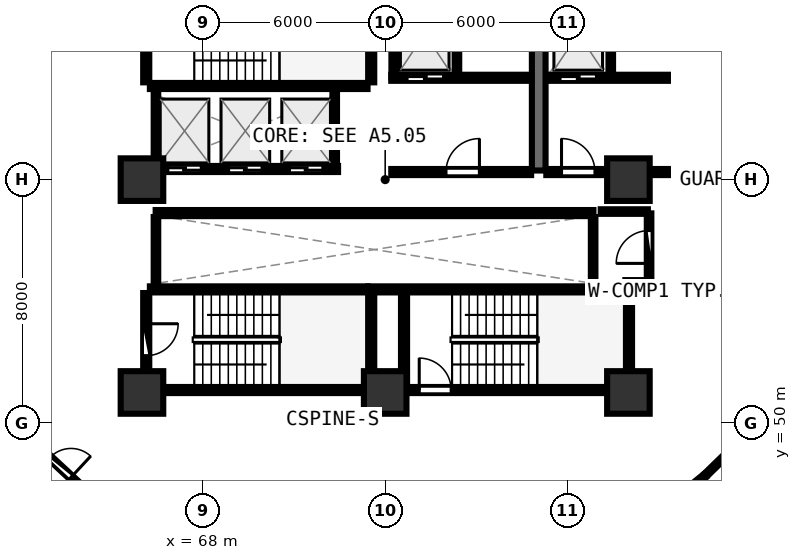
"""IFC4 building model, lengths in metres.
Left out: names, types, materials, properties, quantities, classifications, styles, units other than length and angle.
Written with IfcOpenShell. Run it as: python <this file> out.ifc"""

import sys

from ifc_helpers import new_model, si_unit, direction, frame, frame_2d, origin, origin_2d, place, context, subcontext, project, spatial, rectangle, extrude, element, fill, save


model = new_model("IFC4")
c1 = context("Model", 3, precision=1e-05, world=origin(), true_north=direction((0.0, 1.0)))
c2 = subcontext(c1, "Body", "Model", "MODEL_VIEW")
j1 = project(units=[si_unit("LENGTHUNIT", "METRE"), si_unit("PLANEANGLEUNIT", "RADIAN")], contexts=[c1])
p1 = place(None, origin())
s1 = spatial("IfcSite", under=j1, at=p1, CompositionType="ELEMENT")
p2 = place(p1, origin())
s2 = spatial("IfcBuilding", under=s1, at=p2, CompositionType="ELEMENT")
p3 = place(p2, frame((0.0, 0.0, 22.5)))
s3 = spatial("IfcBuildingStorey", under=s2, at=p3, CompositionType="ELEMENT", Elevation=22.5)
for number, where, z_axis, x_axis in (
    (1, (66.0, 51.0, 0.0), (0.0, 0.0, 1.0), (1.0, 0.0, 0.0)),
    (2, (74.0, 51.0, 0.0), (0.0, 0.0, 1.0), (1.0, 0.0, 0.0)),
    (3, (82.0, 51.0, 0.0), (0.0, 0.0, 1.0), (1.0, 0.0, 0.0)),
    (4, (82.0, 58.0, 0.0), (0.0, 0.0, 1.0), (1.0, 0.0, 0.0)),
    (5, (66.0, 58.0, 0.0), (0.0, 0.0, 1.0), (1.0, 0.0, 0.0)),
):
    element("IfcColumn", number, at=place(p3, frame(where, z_axis=z_axis, x_axis=x_axis)), inside=s3, PredefinedType="PILASTER", context=c2, shape_type="SweptSolid", body=[
        extrude(rectangle(XDim=1.4, YDim=1.4, at=origin_2d()), origin(), (0.0, 0.0, 1.0), 3.75),
    ])
p4 = place(p3, frame((66.26, 61.08, 0.0), z_axis=(0.0, 0.0, 1.0), x_axis=(1.0, 0.0, 0.0)))
e6 = element("IfcWall", 6, at=p4, inside=s3, PredefinedType="SHEAR", context=c2, shape_type="SweptSolid", body=[
    extrude(rectangle(XDim=7.16, YDim=0.2, at=frame_2d((3.58, 0.0))), origin(), (0.0, 0.0, 1.0), 3.49),
])
p5 = place(p3, frame((73.54, 61.2, 0.0), z_axis=(0.0, 0.0, 1.0), x_axis=(0.0, 1.0, 0.0)))
e7 = element("IfcWall", 7, at=p5, inside=s3, PredefinedType="SHEAR", context=c2, shape_type="SweptSolid", body=[
    extrude(rectangle(XDim=3.07, YDim=0.2, at=frame_2d((1.535, 0.0))), origin(), (0.0, 0.0, 1.0), 3.49),
])
p6 = place(p3, frame((66.14, 64.27, 0.0), z_axis=(0.0, 0.0, 1.0), x_axis=(0.0, -1.0, 0.0)))
e8 = element("IfcWall", 8, at=p6, inside=s3, PredefinedType="SHEAR", context=c2, shape_type="SweptSolid", body=[
    extrude(rectangle(XDim=3.07, YDim=0.2, at=frame_2d((1.535, 0.0))), origin(), (0.0, 0.0, 1.0), 3.49),
])
p7 = place(p6, frame((1.01, 0.0, 0.0)))
e9 = element("IfcOpeningElement", 9, at=p7, cuts=e8, PredefinedType="OPENING", context=c2, shape_type="SweptSolid", body=[
    extrude(rectangle(XDim=1.05, YDim=2.1, at=frame_2d((0.525, 1.05))), frame((0.0, 0.11, 0.0), z_axis=(0.0, -1.0, 0.0), x_axis=(1.0, 0.0, 0.0)), (0.0, 0.0, 1.0), 0.22),
])
p8 = place(p3, frame((74.0, 51.08, 0.0), z_axis=(0.0, 0.0, 1.0), x_axis=(1.0, 0.0, 0.0)))
e10 = element("IfcWall", 10, at=p8, inside=s3, PredefinedType="SHEAR", context=c2, shape_type="SweptSolid", body=[
    extrude(rectangle(XDim=7.9, YDim=0.2, at=frame_2d((3.95, 0.0))), origin(), (0.0, 0.0, 1.0), 3.49),
])
p9 = place(p8, frame((1.12, 0.0, 0.0)))
e11 = element("IfcOpeningElement", 11, at=p9, cuts=e10, PredefinedType="OPENING", context=c2, shape_type="SweptSolid", body=[
    extrude(rectangle(XDim=1.05, YDim=2.1, at=frame_2d((0.525, 1.05))), frame((0.0, 0.11, 0.0), z_axis=(0.0, -1.0, 0.0), x_axis=(1.0, 0.0, 0.0)), (0.0, 0.0, 1.0), 0.22),
])
p10 = place(p3, frame((82.02, 51.2, 0.0), z_axis=(0.0, 0.0, 1.0), x_axis=(0.0, 1.0, 0.0)))
e12 = element("IfcWall", 12, at=p10, inside=s3, PredefinedType="SHEAR", context=c2, shape_type="SweptSolid", body=[
    extrude(rectangle(XDim=3.07, YDim=0.2, at=frame_2d((1.535, 0.0))), origin(), (0.0, 0.0, 1.0), 3.49),
])
p11 = place(p3, frame((81.9, 54.39, 0.0), z_axis=(0.0, 0.0, 1.0), x_axis=(-1.0, 0.0, 0.0)))
e13 = element("IfcWall", 13, at=p11, inside=s3, PredefinedType="SHEAR", context=c2, shape_type="SweptSolid", body=[
    extrude(rectangle(XDim=8.46, YDim=0.2, at=frame_2d((4.23, 0.0))), origin(), (0.0, 0.0, 1.0), 3.49),
])
p12 = place(p3, frame((74.62, 54.27, 0.0), z_axis=(0.0, 0.0, 1.0), x_axis=(0.0, -1.0, 0.0)))
e14 = element("IfcWall", 14, at=p12, inside=s3, PredefinedType="SHEAR", context=c2, shape_type="SweptSolid", body=[
    extrude(rectangle(XDim=3.07, YDim=0.2, at=frame_2d((1.535, 0.0))), origin(), (0.0, 0.0, 1.0), 3.49),
])
p13 = place(p3, frame((66.26, 51.08, 0.0), z_axis=(0.0, 0.0, 1.0), x_axis=(1.0, 0.0, 0.0)))
e15 = element("IfcWall", 15, at=p13, inside=s3, PredefinedType="SHEAR", context=c2, shape_type="SweptSolid", body=[
    extrude(rectangle(XDim=7.16, YDim=0.2, at=frame_2d((3.58, 0.0))), origin(), (0.0, 0.0, 1.0), 3.49),
])
p14 = place(p3, frame((73.54, 51.2, 0.0), z_axis=(0.0, 0.0, 1.0), x_axis=(0.0, 1.0, 0.0)))
e16 = element("IfcWall", 16, at=p14, inside=s3, PredefinedType="SHEAR", context=c2, shape_type="SweptSolid", body=[
    extrude(rectangle(XDim=3.07, YDim=0.2, at=frame_2d((1.535, 0.0))), origin(), (0.0, 0.0, 1.0), 3.49),
])
p15 = place(p3, frame((73.42, 54.39, 0.0), z_axis=(0.0, 0.0, 1.0), x_axis=(-1.0, 0.0, 0.0)))
e17 = element("IfcWall", 17, at=p15, inside=s3, PredefinedType="SHEAR", context=c2, shape_type="SweptSolid", body=[
    extrude(rectangle(XDim=7.16, YDim=0.2, at=frame_2d((3.58, 0.0))), origin(), (0.0, 0.0, 1.0), 3.49),
])
p16 = place(p3, frame((66.14, 54.27, 0.0), z_axis=(0.0, 0.0, 1.0), x_axis=(0.0, -1.0, 0.0)))
e18 = element("IfcWall", 18, at=p16, inside=s3, PredefinedType="SHEAR", context=c2, shape_type="SweptSolid", body=[
    extrude(rectangle(XDim=3.07, YDim=0.2, at=frame_2d((1.535, 0.0))), origin(), (0.0, 0.0, 1.0), 3.49),
])
p17 = place(p16, frame((1.01, 0.0, 0.0)))
e19 = element("IfcOpeningElement", 19, at=p17, cuts=e18, PredefinedType="OPENING", context=c2, shape_type="SweptSolid", body=[
    extrude(rectangle(XDim=1.05, YDim=2.1, at=frame_2d((0.525, 1.05))), frame((0.0, 0.11, 0.0), z_axis=(0.0, -1.0, 0.0), x_axis=(1.0, 0.0, 0.0)), (0.0, 0.0, 1.0), 0.22),
])
p18 = place(p3, frame((79.05, 58.3, 0.0), z_axis=(0.0, 0.0, 1.0), x_axis=(0.0, 1.0, 0.0)))
e20 = element("IfcWall", 20, at=p18, inside=s3, PredefinedType="SHEAR", context=c2, shape_type="SweptSolid", body=[
    extrude(rectangle(XDim=6.3, YDim=0.45, at=frame_2d((3.15, 0.0))), origin(), (0.0, 0.0, 1.0), 3.49),
])
p19 = place(p3, frame((74.2, 61.35, 0.0), z_axis=(0.0, 0.0, 1.0), x_axis=(1.0, 0.0, 0.0)))
e21 = element("IfcWall", 21, at=p19, inside=s3, PredefinedType="SOLIDWALL", context=c2, shape_type="SweptSolid", body=[
    extrude(rectangle(XDim=4.6, YDim=0.2, at=frame_2d((2.3, 0.0))), origin(), (0.0, 0.0, 1.0), 3.48),
])
p20 = place(p19, frame((0.52, 0.0, 0.0)))
e22 = element("IfcOpeningElement", 22, at=p20, cuts=e21, PredefinedType="OPENING", context=c2, shape_type="SweptSolid", body=[
    extrude(rectangle(XDim=1.2, YDim=2.15, at=frame_2d((0.6, 1.075))), frame((0.0, 0.11, 0.0), z_axis=(0.0, -1.0, 0.0), x_axis=(1.0, 0.0, 0.0)), (0.0, 0.0, 1.0), 0.22),
])
p21 = place(p3, frame((74.28, 61.35, 0.0), z_axis=(0.0, 0.0, 1.0), x_axis=(0.0, 1.0, 0.0)))
e23 = element("IfcWall", 23, at=p21, inside=s3, PredefinedType="PARTITIONING", context=c2, shape_type="SweptSolid", body=[
    extrude(rectangle(XDim=2.97, YDim=0.15, at=frame_2d((1.485, 0.0))), origin(), (0.0, 0.0, 1.0), 3.48),
])
p22 = place(p3, frame((76.36, 61.48, 0.0), z_axis=(0.0, 0.0, 1.0), x_axis=(0.0, 1.0, 0.0)))
e24 = element("IfcWall", 24, at=p22, inside=s3, PredefinedType="PARTITIONING", context=c2, shape_type="SweptSolid", body=[
    extrude(rectangle(XDim=2.84, YDim=0.15, at=frame_2d((1.42, 0.0))), origin(), (0.0, 0.0, 1.0), 3.48),
])
p23 = place(p3, frame((79.3, 61.35, 0.0), z_axis=(0.0, 0.0, 1.0), x_axis=(1.0, 0.0, 0.0)))
e25 = element("IfcWall", 25, at=p23, inside=s3, PredefinedType="SOLIDWALL", context=c2, shape_type="SweptSolid", body=[
    extrude(rectangle(XDim=4.0, YDim=0.2, at=frame_2d((2.0, 0.0))), origin(), (0.0, 0.0, 1.0), 2.775),
])
p24 = place(p23, frame((0.45, 0.0, 0.0)))
e26 = element("IfcOpeningElement", 26, at=p24, cuts=e25, PredefinedType="OPENING", context=c2, shape_type="SweptSolid", body=[
    extrude(rectangle(XDim=1.2, YDim=2.15, at=frame_2d((0.6, 1.075))), frame((0.0, 0.11, 0.0), z_axis=(0.0, -1.0, 0.0), x_axis=(1.0, 0.0, 0.0)), (0.0, 0.0, 1.0), 0.22),
])
p25 = place(p3, frame((81.42, 61.48, 0.0), z_axis=(0.0, 0.0, 1.0), x_axis=(0.0, 1.0, 0.0)))
e27 = element("IfcWall", 27, at=p25, inside=s3, PredefinedType="PARTITIONING", context=c2, shape_type="SweptSolid", body=[
    extrude(rectangle(XDim=2.84, YDim=0.15, at=frame_2d((1.42, 0.0))), origin(), (0.0, 0.0, 1.0), 3.48),
])
p26 = place(p3, frame((74.2, 58.25, 0.0), z_axis=(0.0, 0.0, 1.0), x_axis=(1.0, 0.0, 0.0)))
e28 = element("IfcWall", 28, at=p26, inside=s3, PredefinedType="SOLIDWALL", context=c2, shape_type="SweptSolid", body=[
    extrude(rectangle(XDim=4.6, YDim=0.2, at=frame_2d((2.3, 0.0))), origin(), (0.0, 0.0, 1.0), 3.48),
])
p27 = place(p26, frame((1.8, 0.0, 0.0)))
e29 = element("IfcOpeningElement", 29, at=p27, cuts=e28, PredefinedType="OPENING", context=c2, shape_type="SweptSolid", body=[
    extrude(rectangle(XDim=1.1, YDim=2.1, at=frame_2d((0.55, 1.05))), frame((0.0, 0.11, 0.0), z_axis=(0.0, -1.0, 0.0), x_axis=(1.0, 0.0, 0.0)), (0.0, 0.0, 1.0), 0.22),
])
p28 = place(p3, frame((79.3, 58.25, 0.0), z_axis=(0.0, 0.0, 1.0), x_axis=(1.0, 0.0, 0.0)))
e30 = element("IfcWall", 30, at=p28, inside=s3, PredefinedType="SOLIDWALL", context=c2, shape_type="SweptSolid", body=[
    extrude(rectangle(XDim=4.0, YDim=0.2, at=frame_2d((2.0, 0.0))), origin(), (0.0, 0.0, 1.0), 2.775),
])
p29 = place(p28, frame((0.5, 0.0, 0.0)))
e31 = element("IfcOpeningElement", 31, at=p29, cuts=e30, PredefinedType="OPENING", context=c2, shape_type="SweptSolid", body=[
    extrude(rectangle(XDim=1.1, YDim=2.1, at=frame_2d((0.55, 1.05))), frame((0.0, 0.11, 0.0), z_axis=(0.0, -1.0, 0.0), x_axis=(1.0, 0.0, 0.0)), (0.0, 0.0, 1.0), 0.22),
])
p30 = place(p3, frame((66.45, 58.35, 0.0), z_axis=(0.0, 0.0, 1.0), x_axis=(1.0, 0.0, 0.0)))
e32 = element("IfcWall", 32, at=p30, inside=s3, PredefinedType="SOLIDWALL", context=c2, shape_type="SweptSolid", body=[
    extrude(rectangle(XDim=6.0, YDim=0.2, at=frame_2d((3.0, 0.0))), origin(), (0.0, 0.0, 1.0), 3.48),
])
p31 = place(p30, frame((0.4, 0.0, 0.0)))
e33 = element("IfcOpeningElement", 33, at=p31, cuts=e32, PredefinedType="OPENING", context=c2, shape_type="SweptSolid", body=[
    extrude(rectangle(XDim=1.1, YDim=2.1, at=frame_2d((0.55, 1.05))), frame((0.0, 0.11, 0.0), z_axis=(0.0, -1.0, 0.0), x_axis=(1.0, 0.0, 0.0)), (0.0, 0.0, 1.0), 0.22),
])
p32 = place(p30, frame((2.4, 0.0, 0.0)))
e34 = element("IfcOpeningElement", 34, at=p32, cuts=e32, PredefinedType="OPENING", context=c2, shape_type="SweptSolid", body=[
    extrude(rectangle(XDim=1.1, YDim=2.1, at=frame_2d((0.55, 1.05))), frame((0.0, 0.11, 0.0), z_axis=(0.0, -1.0, 0.0), x_axis=(1.0, 0.0, 0.0)), (0.0, 0.0, 1.0), 0.22),
])
p33 = place(p30, frame((4.4, 0.0, 0.0)))
e35 = element("IfcOpeningElement", 35, at=p33, cuts=e32, PredefinedType="OPENING", context=c2, shape_type="SweptSolid", body=[
    extrude(rectangle(XDim=1.1, YDim=2.1, at=frame_2d((0.55, 1.05))), frame((0.0, 0.11, 0.0), z_axis=(0.0, -1.0, 0.0), x_axis=(1.0, 0.0, 0.0)), (0.0, 0.0, 1.0), 0.22),
])
for number, where, z_axis, x_axis in (
    (36, (66.46, 58.48, 0.0), (0.0, 0.0, 1.0), (0.0, 1.0, 0.0)),
    (37, (72.34, 58.48, 0.0), (0.0, 0.0, 1.0), (0.0, 1.0, 0.0)),
):
    element("IfcWall", number, at=place(p3, frame(where, z_axis=z_axis, x_axis=x_axis)), inside=s3, PredefinedType="PARTITIONING", context=c2, shape_type="SweptSolid", body=[
        extrude(rectangle(XDim=2.46, YDim=0.15, at=frame_2d((1.23, 0.0))), origin(), (0.0, 0.0, 1.0), 3.48),
    ])
p34 = place(p3, frame((66.45, 56.9, 0.0), z_axis=(0.0, 0.0, 1.0), x_axis=(1.0, 0.0, 0.0)))
e38 = element("IfcWall", 38, at=p34, inside=s3, PredefinedType="SOLIDWALL", context=c2, shape_type="SweptSolid", body=[
    extrude(rectangle(XDim=14.4, YDim=0.2, at=frame_2d((7.2, 0.0))), origin(), (0.0, 0.0, 1.0), 3.48),
])
for number, where, z_axis, x_axis in (
    (39, (66.46, 54.48, 0.0), (0.0, 0.0, 1.0), (0.0, 1.0, 0.0)),
    (40, (80.84, 54.48, 0.0), (0.0, 0.0, 1.0), (0.0, 1.0, 0.0)),
):
    element("IfcWall", number, at=place(p3, frame(where, z_axis=z_axis, x_axis=x_axis)), inside=s3, PredefinedType="PARTITIONING", context=c2, shape_type="SweptSolid", body=[
        extrude(rectangle(XDim=2.29, YDim=0.15, at=frame_2d((1.145, 0.0))), origin(), (0.0, 0.0, 1.0), 3.48),
    ])
p35 = place(p3, frame((82.68, 54.68, 0.0), z_axis=(0.0, 0.0, 1.0), x_axis=(0.0, 1.0, 0.0)))
e41 = element("IfcWall", 41, at=p35, inside=s3, PredefinedType="PARTITIONING", context=c2, shape_type="SweptSolid", body=[
    extrude(rectangle(XDim=2.21, YDim=0.15, at=frame_2d((1.105, 0.0))), origin(), (0.0, 0.0, 1.0), 3.48),
])
p36 = place(p35, frame((0.565, 0.0, 0.0)))
e42 = element("IfcOpeningElement", 42, at=p36, cuts=e41, PredefinedType="OPENING", context=c2, shape_type="SweptSolid", body=[
    extrude(rectangle(XDim=1.08, YDim=2.1, at=frame_2d((0.54, 1.05))), frame((0.0, 0.085, 0.0), z_axis=(0.0, -1.0, 0.0), x_axis=(1.0, 0.0, 0.0)), (0.0, 0.0, 1.0), 0.17),
])
p37 = place(p3, frame((62.194, 49.575, 0.0), z_axis=(0.0, 0.0, 1.0), x_axis=(0.7329267348, -0.680307578538, 0.0)))
e43 = element("IfcWall", 43, at=p37, inside=s3, PredefinedType="PARTITIONING", context=c2, shape_type="SweptSolid", body=[
    extrude(rectangle(XDim=3.067, YDim=0.15, at=frame_2d((1.533, 0.0))), origin(), (0.0, 0.0, 1.0), 2.875),
])
p38 = place(p37, frame((1.059, 0.0, 0.0)))
e44 = element("IfcOpeningElement", 44, at=p38, cuts=e43, PredefinedType="OPENING", context=c2, shape_type="SweptSolid", body=[
    extrude(rectangle(XDim=0.95, YDim=2.08, at=frame_2d((0.475, 1.04))), frame((0.0, 0.085, 0.0), z_axis=(0.0, -1.0, 0.0), x_axis=(1.0, 0.0, 0.0)), (0.0, 0.0, 1.0), 0.17),
])
p39 = place(p3, frame((81.9, 54.62, 0.0), z_axis=(0.0, 0.0, 1.0), x_axis=(1.0, 0.0, 0.0)))
e45 = element("IfcWall", 45, at=p39, inside=s3, PredefinedType="PARTITIONING", context=c2, shape_type="SweptSolid", body=[
    extrude(rectangle(XDim=0.74, YDim=0.15, at=frame_2d((0.37, 0.0))), origin(), (0.0, 0.0, 1.0), 2.775),
])
p40 = place(p3, frame((82.64, 56.95, 0.0), z_axis=(0.0, 0.0, 1.0), x_axis=(-1.0, 0.0, 0.0)))
e46 = element("IfcWall", 46, at=p40, inside=s3, PredefinedType="PARTITIONING", context=c2, shape_type="SweptSolid", body=[
    extrude(rectangle(XDim=1.55, YDim=0.15, at=frame_2d((0.775, 0.0))), origin(), (0.0, 0.0, 1.0), 2.775),
])
p41 = place(p3, frame((83.53, 47.461, 0.0), z_axis=(0.0, 0.0, 1.0), x_axis=(0.77596084644, 0.63078107517, 0.0)))
e47 = element("IfcWall", 47, at=p41, inside=s3, PredefinedType="PLUMBINGWALL", context=c2, shape_type="SweptSolid", body=[
    extrude(rectangle(XDim=1.268, YDim=0.13, at=frame_2d((0.634, 0.0))), origin(), (0.0, 0.0, 1.0), 2.875),
])
p42 = place(p3, frame((84.543, 48.287, 0.0), z_axis=(0.0, 0.0, 1.0), x_axis=(0.715980731769, 0.698120041064, 0.0)))
e48 = element("IfcWall", 48, at=p42, inside=s3, PredefinedType="PLUMBINGWALL", context=c2, shape_type="SweptSolid", body=[
    extrude(rectangle(XDim=1.258, YDim=0.13, at=frame_2d((0.629, 0.0))), origin(), (0.0, 0.0, 1.0), 2.875),
])
p43 = place(p9, origin())
e49 = element("IfcDoor", 49, at=p43, inside=s3, OperationType="SINGLE_SWING_LEFT", PredefinedType="DOOR", context=c2, shape_type="SweptSolid", body=[
    extrude(rectangle(XDim=1.05, YDim=2.1, at=frame_2d((0.525, 1.05))), frame((0.0, 0.025, 0.0), z_axis=(0.0, -1.0, 0.0), x_axis=(1.0, 0.0, 0.0)), (0.0, 0.0, 1.0), 0.05),
])
fill(e11, e49)
p44 = place(p17, origin())
e50 = element("IfcDoor", 50, at=p44, inside=s3, OperationType="SINGLE_SWING_LEFT", PredefinedType="DOOR", context=c2, shape_type="SweptSolid", body=[
    extrude(rectangle(XDim=1.05, YDim=2.1, at=frame_2d((0.525, 1.05))), frame((0.0, 0.025, 0.0), z_axis=(0.0, -1.0, 0.0), x_axis=(1.0, 0.0, 0.0)), (0.0, 0.0, 1.0), 0.05),
])
fill(e19, e50)
p45 = place(p20, origin())
e51 = element("IfcDoor", 51, at=p45, inside=s3, OperationType="DOUBLE_DOOR_SLIDING", PredefinedType="DOOR", context=c2, shape_type="SweptSolid", body=[
    extrude(rectangle(XDim=1.2, YDim=2.15, at=frame_2d((0.6, 1.075))), frame((0.0, 0.025, 0.0), z_axis=(0.0, -1.0, 0.0), x_axis=(1.0, 0.0, 0.0)), (0.0, 0.0, 1.0), 0.05),
])
fill(e22, e51)
p46 = place(p24, origin())
e52 = element("IfcDoor", 52, at=p46, inside=s3, OperationType="DOUBLE_DOOR_SLIDING", PredefinedType="DOOR", context=c2, shape_type="SweptSolid", body=[
    extrude(rectangle(XDim=1.2, YDim=2.15, at=frame_2d((0.6, 1.075))), frame((0.0, 0.025, 0.0), z_axis=(0.0, -1.0, 0.0), x_axis=(1.0, 0.0, 0.0)), (0.0, 0.0, 1.0), 0.05),
])
fill(e26, e52)
p47 = place(p27, frame((1.1, 0.0, 0.0), z_axis=(0.0, 0.0, 1.0), x_axis=(-1.0, 0.0, 0.0)))
e53 = element("IfcDoor", 53, at=p47, inside=s3, OperationType="SINGLE_SWING_LEFT", PredefinedType="DOOR", context=c2, shape_type="SweptSolid", body=[
    extrude(rectangle(XDim=1.1, YDim=2.1, at=frame_2d((0.55, 1.05))), frame((0.0, 0.025, 0.0), z_axis=(0.0, -1.0, 0.0), x_axis=(1.0, 0.0, 0.0)), (0.0, 0.0, 1.0), 0.05),
])
fill(e29, e53)
p48 = place(p29, frame((1.1, 0.0, 0.0), z_axis=(0.0, 0.0, 1.0), x_axis=(-1.0, 0.0, 0.0)))
e54 = element("IfcDoor", 54, at=p48, inside=s3, OperationType="SINGLE_SWING_RIGHT", PredefinedType="DOOR", context=c2, shape_type="SweptSolid", body=[
    extrude(rectangle(XDim=1.1, YDim=2.1, at=frame_2d((0.55, 1.05))), frame((0.0, 0.025, 0.0), z_axis=(0.0, -1.0, 0.0), x_axis=(1.0, 0.0, 0.0)), (0.0, 0.0, 1.0), 0.05),
])
fill(e31, e54)
p49 = place(p31, origin())
e55 = element("IfcDoor", 55, at=p49, inside=s3, OperationType="DOUBLE_DOOR_SLIDING", PredefinedType="DOOR", context=c2, shape_type="SweptSolid", body=[
    extrude(rectangle(XDim=1.1, YDim=2.1, at=frame_2d((0.55, 1.05))), frame((0.0, 0.025, 0.0), z_axis=(0.0, -1.0, 0.0), x_axis=(1.0, 0.0, 0.0)), (0.0, 0.0, 1.0), 0.05),
])
fill(e33, e55)
p50 = place(p32, origin())
e56 = element("IfcDoor", 56, at=p50, inside=s3, OperationType="DOUBLE_DOOR_SLIDING", PredefinedType="DOOR", context=c2, shape_type="SweptSolid", body=[
    extrude(rectangle(XDim=1.1, YDim=2.1, at=frame_2d((0.55, 1.05))), frame((0.0, 0.025, 0.0), z_axis=(0.0, -1.0, 0.0), x_axis=(1.0, 0.0, 0.0)), (0.0, 0.0, 1.0), 0.05),
])
fill(e34, e56)
p51 = place(p33, origin())
e57 = element("IfcDoor", 57, at=p51, inside=s3, OperationType="DOUBLE_DOOR_SLIDING", PredefinedType="DOOR", context=c2, shape_type="SweptSolid", body=[
    extrude(rectangle(XDim=1.1, YDim=2.1, at=frame_2d((0.55, 1.05))), frame((0.0, 0.025, 0.0), z_axis=(0.0, -1.0, 0.0), x_axis=(1.0, 0.0, 0.0)), (0.0, 0.0, 1.0), 0.05),
])
fill(e35, e57)
p52 = place(p36, origin())
e58 = element("IfcDoor", 58, at=p52, inside=s3, OperationType="SINGLE_SWING_LEFT", PredefinedType="DOOR", context=c2, shape_type="SweptSolid", body=[
    extrude(rectangle(XDim=1.08, YDim=2.1, at=frame_2d((0.54, 1.05))), frame((0.0, 0.025, 0.0), z_axis=(0.0, -1.0, 0.0), x_axis=(1.0, 0.0, 0.0)), (0.0, 0.0, 1.0), 0.05),
])
fill(e42, e58)
p53 = place(p38, origin())
e59 = element("IfcDoor", 59, at=p53, inside=s3, OperationType="SINGLE_SWING_RIGHT", PredefinedType="DOOR", context=c2, shape_type="SweptSolid", body=[
    extrude(rectangle(XDim=0.95, YDim=2.08, at=frame_2d((0.475, 1.04))), frame((0.0, 0.025, 0.0), z_axis=(0.0, -1.0, 0.0), x_axis=(1.0, 0.0, 0.0)), (0.0, 0.0, 1.0), 0.05),
])
fill(e44, e59)
save(model, sys.argv[1])
